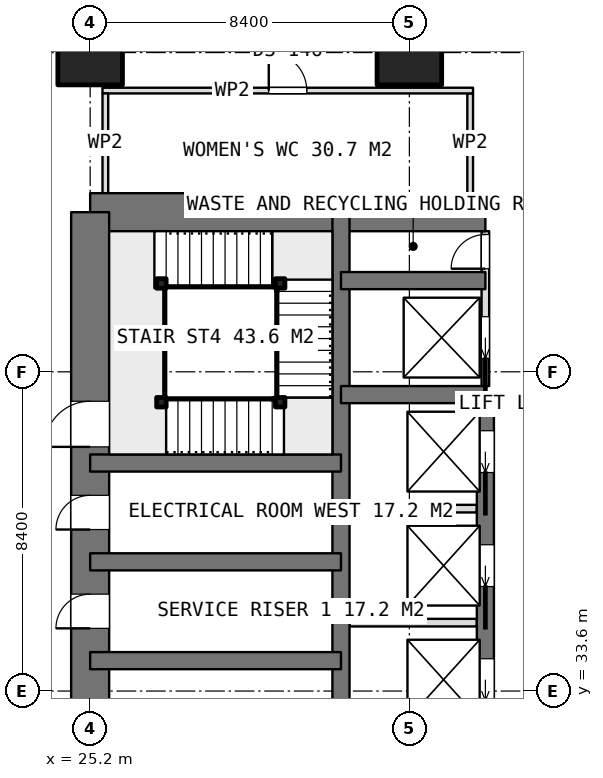
"""IFC4 building model, lengths in metres.
Left out: names, types, materials, properties, quantities, classifications, styles, units other than length and angle.
Written with IfcOpenShell. Run it as: python <this file> out.ifc"""

import sys

from ifc_helpers import new_model, si_unit, direction, frame, frame_2d, origin, origin_2d, place, context, subcontext, project, spatial, rectangle, extrude, element, fill, save


model = new_model("IFC4")
c1 = context("Model", 3, precision=1e-05, world=origin(), true_north=direction((0.0, 1.0)))
c2 = subcontext(c1, "Body", "Model", "MODEL_VIEW")
j1 = project(units=[si_unit("LENGTHUNIT", "METRE"), si_unit("PLANEANGLEUNIT", "RADIAN")], contexts=[c1])
p1 = place(None, origin())
s1 = spatial("IfcSite", under=j1, at=p1, CompositionType="ELEMENT")
p2 = place(p1, origin())
s2 = spatial("IfcBuilding", under=s1, at=p2, CompositionType="ELEMENT")
p3 = place(p2, frame((0.0, 0.0, 136.55)))
s3 = spatial("IfcBuildingStorey", under=s2, at=p3, CompositionType="ELEMENT", Elevation=136.55)
p4 = place(p3, frame((25.2, 46.2, 0.0), z_axis=(0.0, 0.0, 1.0), x_axis=(1.0, 0.0, 0.0)))
e1 = element("IfcWall", 1, at=p4, inside=s3, PredefinedType="SHEAR", context=c2, shape_type="SweptSolid", body=[
    extrude(rectangle(XDim=10.4, YDim=1.0, at=frame_2d((5.2, 0.0))), origin(), (0.0, 0.0, 1.0), 3.75),
])
p5 = place(p3, frame((25.2, 21.0, 0.0), z_axis=(0.0, 0.0, 1.0), x_axis=(0.0, 1.0, 0.0)))
e2 = element("IfcWall", 2, at=p5, inside=s3, PredefinedType="SHEAR", context=c2, shape_type="SweptSolid", body=[
    extrude(rectangle(XDim=25.2, YDim=1.0, at=frame_2d((12.6, 0.0))), origin(), (0.0, 0.0, 1.0), 3.75),
])
p6 = place(p5, frame((7.8, 0.0, 0.0)))
e3 = element("IfcOpeningElement", 3, at=p6, cuts=e2, PredefinedType="OPENING", context=c2, shape_type="SweptSolid", body=[
    extrude(rectangle(XDim=1.2, YDim=2.1, at=frame_2d((0.6, 1.05))), frame((0.0, 0.51, 0.0), z_axis=(0.0, -1.0, 0.0), x_axis=(1.0, 0.0, 0.0)), (0.0, 0.0, 1.0), 1.02),
])
p7 = place(p5, frame((14.25, 0.0, 0.0)))
e4 = element("IfcOpeningElement", 4, at=p7, cuts=e2, PredefinedType="OPENING", context=c2, shape_type="SweptSolid", body=[
    extrude(rectangle(XDim=0.9, YDim=2.1, at=frame_2d((0.45, 1.05))), frame((0.0, 0.51, 0.0), z_axis=(0.0, -1.0, 0.0), x_axis=(1.0, 0.0, 0.0)), (0.0, 0.0, 1.0), 1.02),
])
p8 = place(p5, frame((16.85, 0.0, 0.0)))
e5 = element("IfcOpeningElement", 5, at=p8, cuts=e2, PredefinedType="OPENING", context=c2, shape_type="SweptSolid", body=[
    extrude(rectangle(XDim=0.9, YDim=2.1, at=frame_2d((0.45, 1.05))), frame((0.0, 0.51, 0.0), z_axis=(0.0, -1.0, 0.0), x_axis=(1.0, 0.0, 0.0)), (0.0, 0.0, 1.0), 1.02),
])
p9 = place(p5, frame((19.025, 0.0, 0.0)))
e6 = element("IfcOpeningElement", 6, at=p9, cuts=e2, PredefinedType="OPENING", context=c2, shape_type="SweptSolid", body=[
    extrude(rectangle(XDim=1.2, YDim=2.1, at=frame_2d((0.6, 1.05))), frame((0.0, 0.51, 0.0), z_axis=(0.0, -1.0, 0.0), x_axis=(1.0, 0.0, 0.0)), (0.0, 0.0, 1.0), 1.02),
])
p10 = place(p3, frame((31.8, 21.0, 0.0), z_axis=(0.0, 0.0, 1.0), x_axis=(0.0, 1.0, 0.0)))
e7 = element("IfcWall", 7, at=p10, inside=s3, PredefinedType="SHEAR", context=c2, shape_type="SweptSolid", body=[
    extrude(rectangle(XDim=25.2, YDim=0.45, at=frame_2d((12.6, 0.0))), origin(), (0.0, 0.0, 1.0), 3.75),
])
p11 = place(p3, frame((35.6, 23.4, 0.0), z_axis=(0.0, 0.0, 1.0), x_axis=(0.0, 1.0, 0.0)))
e8 = element("IfcWall", 8, at=p11, inside=s3, PredefinedType="SHEAR", context=c2, shape_type="SweptSolid", body=[
    extrude(rectangle(XDim=18.0, YDim=0.45, at=frame_2d((9.0, 0.0))), origin(), (0.0, 0.0, 1.0), 3.75),
])
p12 = place(p11, frame((0.95, 0.0, 0.0)))
e9 = element("IfcOpeningElement", 9, at=p12, cuts=e8, PredefinedType="OPENING", context=c2, shape_type="SweptSolid", body=[
    extrude(rectangle(XDim=1.1, YDim=2.1, at=frame_2d((0.55, 1.05))), frame((0.0, 0.235, 0.0), z_axis=(0.0, -1.0, 0.0), x_axis=(1.0, 0.0, 0.0)), (0.0, 0.0, 1.0), 0.47),
])
p13 = place(p11, frame((3.95, 0.0, 0.0)))
e10 = element("IfcOpeningElement", 10, at=p13, cuts=e8, PredefinedType="OPENING", context=c2, shape_type="SweptSolid", body=[
    extrude(rectangle(XDim=1.1, YDim=2.1, at=frame_2d((0.55, 1.05))), frame((0.0, 0.235, 0.0), z_axis=(0.0, -1.0, 0.0), x_axis=(1.0, 0.0, 0.0)), (0.0, 0.0, 1.0), 0.47),
])
p14 = place(p11, frame((6.95, 0.0, 0.0)))
e11 = element("IfcOpeningElement", 11, at=p14, cuts=e8, PredefinedType="OPENING", context=c2, shape_type="SweptSolid", body=[
    extrude(rectangle(XDim=1.1, YDim=2.1, at=frame_2d((0.55, 1.05))), frame((0.0, 0.235, 0.0), z_axis=(0.0, -1.0, 0.0), x_axis=(1.0, 0.0, 0.0)), (0.0, 0.0, 1.0), 0.47),
])
p15 = place(p11, frame((9.95, 0.0, 0.0)))
e12 = element("IfcOpeningElement", 12, at=p15, cuts=e8, PredefinedType="OPENING", context=c2, shape_type="SweptSolid", body=[
    extrude(rectangle(XDim=1.1, YDim=2.1, at=frame_2d((0.55, 1.05))), frame((0.0, 0.235, 0.0), z_axis=(0.0, -1.0, 0.0), x_axis=(1.0, 0.0, 0.0)), (0.0, 0.0, 1.0), 0.47),
])
p16 = place(p11, frame((12.95, 0.0, 0.0)))
e13 = element("IfcOpeningElement", 13, at=p16, cuts=e8, PredefinedType="OPENING", context=c2, shape_type="SweptSolid", body=[
    extrude(rectangle(XDim=1.1, YDim=2.1, at=frame_2d((0.55, 1.05))), frame((0.0, 0.235, 0.0), z_axis=(0.0, -1.0, 0.0), x_axis=(1.0, 0.0, 0.0)), (0.0, 0.0, 1.0), 0.47),
])
p17 = place(p11, frame((15.95, 0.0, 0.0)))
e14 = element("IfcOpeningElement", 14, at=p17, cuts=e8, PredefinedType="OPENING", context=c2, shape_type="SweptSolid", body=[
    extrude(rectangle(XDim=1.1, YDim=2.1, at=frame_2d((0.55, 1.05))), frame((0.0, 0.235, 0.0), z_axis=(0.0, -1.0, 0.0), x_axis=(1.0, 0.0, 0.0)), (0.0, 0.0, 1.0), 0.47),
])
for number, where, z_axis, x_axis in (
    (15, (31.8, 41.4, 0.0), (0.0, 0.0, 1.0), (1.0, 0.0, 0.0)),
    (16, (31.8, 44.4, 0.0), (0.0, 0.0, 1.0), (1.0, 0.0, 0.0)),
):
    element("IfcWall", number, at=place(p3, frame(where, z_axis=z_axis, x_axis=x_axis)), inside=s3, PredefinedType="SHEAR", context=c2, shape_type="SweptSolid", body=[
        extrude(rectangle(XDim=3.8, YDim=0.45, at=frame_2d((1.9, 0.0))), origin(), (0.0, 0.0, 1.0), 3.75),
    ])
for number, where, z_axis, x_axis in (
    (17, (25.2, 34.4, 0.0), (0.0, 0.0, 1.0), (1.0, 0.0, 0.0)),
    (18, (25.2, 37.0, 0.0), (0.0, 0.0, 1.0), (1.0, 0.0, 0.0)),
    (19, (25.2, 39.6, 0.0), (0.0, 0.0, 1.0), (1.0, 0.0, 0.0)),
):
    element("IfcWall", number, at=place(p3, frame(where, z_axis=z_axis, x_axis=x_axis)), inside=s3, PredefinedType="SHEAR", context=c2, shape_type="SweptSolid", body=[
        extrude(rectangle(XDim=6.6, YDim=0.45, at=frame_2d((3.3, 0.0))), origin(), (0.0, 0.0, 1.0), 3.75),
    ])
for number, where, z_axis, x_axis in (
    (20, (25.2, 50.4, 0.0), (0.0, 0.0, 1.0), (1.0, 0.0, 0.0)),
    (21, (33.6, 50.4, 0.0), (0.0, 0.0, 1.0), (1.0, 0.0, 0.0)),
):
    element("IfcColumn", number, at=place(p3, frame(where, z_axis=z_axis, x_axis=x_axis)), inside=s3, PredefinedType="COLUMN", context=c2, shape_type="SweptSolid", body=[
        extrude(rectangle(XDim=1.7, YDim=1.7, at=origin_2d()), origin(), (0.0, 0.0, 1.0), 3.75),
    ])
for number, where, z_axis, x_axis in (
    (22, (32.025, 35.4, 0.0), (0.0, 0.0, 1.0), (1.0, 0.0, 0.0)),
    (23, (32.025, 38.4, 0.0), (0.0, 0.0, 1.0), (1.0, 0.0, 0.0)),
):
    element("IfcWall", number, at=place(p3, frame(where, z_axis=z_axis, x_axis=x_axis)), inside=s3, PredefinedType="PARTITIONING", context=c2, shape_type="SweptSolid", body=[
        extrude(rectangle(XDim=3.35, YDim=0.2, at=frame_2d((1.675, 0.0))), origin(), (0.0, 0.0, 1.0), 3.5),
    ])
p18 = place(p3, frame((35.6, 41.625, 0.0), z_axis=(0.0, 0.0, 1.0), x_axis=(0.0, 1.0, 0.0)))
e24 = element("IfcWall", 24, at=p18, inside=s3, PredefinedType="PARTITIONING", context=c2, shape_type="SweptSolid", body=[
    extrude(rectangle(XDim=4.075, YDim=0.2, at=frame_2d((2.038, 0.0))), origin(), (0.0, 0.0, 1.0), 3.5),
])
p19 = place(p18, frame((3.088, 0.0, 0.0)))
e25 = element("IfcOpeningElement", 25, at=p19, cuts=e24, PredefinedType="OPENING", context=c2, shape_type="SweptSolid", body=[
    extrude(rectangle(XDim=0.9, YDim=2.1, at=frame_2d((0.45, 1.05))), frame((0.0, 0.11, 0.0), z_axis=(0.0, -1.0, 0.0), x_axis=(1.0, 0.0, 0.0)), (0.0, 0.0, 1.0), 0.22),
])
p20 = place(p18, frame((0.725, 0.0, 0.0)))
e26 = element("IfcOpeningElement", 26, at=p20, cuts=e24, PredefinedType="OPENING", context=c2, shape_type="SweptSolid", body=[
    extrude(rectangle(XDim=1.1, YDim=2.1, at=frame_2d((0.55, 1.05))), frame((0.0, 0.11, 0.0), z_axis=(0.0, -1.0, 0.0), x_axis=(1.0, 0.0, 0.0)), (0.0, 0.0, 1.0), 0.22),
])
p21 = place(p3, frame((25.525, 49.4, 0.0), z_axis=(0.0, 0.0, 1.0), x_axis=(1.0, 0.0, 0.0)))
e27 = element("IfcWall", 27, at=p21, inside=s3, PredefinedType="PARTITIONING", context=c2, shape_type="SweptSolid", body=[
    extrude(rectangle(XDim=9.75, YDim=0.15, at=frame_2d((4.875, 0.0))), origin(), (0.0, 0.0, 1.0), 3.5),
])
p22 = place(p21, frame((4.375, 0.0, 0.0)))
e28 = element("IfcOpeningElement", 28, at=p22, cuts=e27, PredefinedType="OPENING", context=c2, shape_type="SweptSolid", body=[
    extrude(rectangle(XDim=1.0, YDim=2.1, at=frame_2d((0.5, 1.05))), frame((0.0, 0.085, 0.0), z_axis=(0.0, -1.0, 0.0), x_axis=(1.0, 0.0, 0.0)), (0.0, 0.0, 1.0), 0.17),
])
for number, where, z_axis, x_axis in (
    (29, (25.6, 46.7, 0.0), (0.0, 0.0, 1.0), (0.0, 1.0, 0.0)),
    (30, (35.2, 46.7, 0.0), (0.0, 0.0, 1.0), (0.0, 1.0, 0.0)),
):
    element("IfcWall", number, at=place(p3, frame(where, z_axis=z_axis, x_axis=x_axis)), inside=s3, PredefinedType="PARTITIONING", context=c2, shape_type="SweptSolid", body=[
        extrude(rectangle(XDim=2.625, YDim=0.15, at=frame_2d((1.312, 0.0))), origin(), (0.0, 0.0, 1.0), 3.5),
    ])
for number, where, z_axis, x_axis in (
    (31, (27.075, 41.2, 0.0), (0.0, 0.0, 1.0), (1.0, 0.0, 0.0)),
    (32, (30.2, 41.2, 0.0), (0.0, 0.0, 1.0), (1.0, 0.0, 0.0)),
    (33, (30.2, 44.325, 0.0), (0.0, 0.0, 1.0), (1.0, 0.0, 0.0)),
    (34, (27.075, 44.325, 0.0), (0.0, 0.0, 1.0), (1.0, 0.0, 0.0)),
):
    element("IfcColumn", number, at=place(p3, frame(where, z_axis=z_axis, x_axis=x_axis)), inside=s3, PredefinedType="COLUMN", context=c2, shape_type="SweptSolid", body=[
        extrude(rectangle(XDim=0.25, YDim=0.25, at=origin_2d()), origin(), (0.0, 0.0, 1.0), 3.75),
    ])
p23 = place(p7, origin())
e35 = element("IfcDoor", 35, at=p23, inside=s3, OperationType="SINGLE_SWING_LEFT", PredefinedType="DOOR", context=c2, shape_type="SweptSolid", body=[
    extrude(rectangle(XDim=0.9, YDim=2.1, at=frame_2d((0.45, 1.05))), frame((0.0, 0.025, 0.0), z_axis=(0.0, -1.0, 0.0), x_axis=(1.0, 0.0, 0.0)), (0.0, 0.0, 1.0), 0.05),
])
fill(e4, e35)
p24 = place(p8, origin())
e36 = element("IfcDoor", 36, at=p24, inside=s3, OperationType="SINGLE_SWING_LEFT", PredefinedType="DOOR", context=c2, shape_type="SweptSolid", body=[
    extrude(rectangle(XDim=0.9, YDim=2.1, at=frame_2d((0.45, 1.05))), frame((0.0, 0.025, 0.0), z_axis=(0.0, -1.0, 0.0), x_axis=(1.0, 0.0, 0.0)), (0.0, 0.0, 1.0), 0.05),
])
fill(e5, e36)
p25 = place(p19, origin())
e37 = element("IfcDoor", 37, at=p25, inside=s3, OperationType="SINGLE_SWING_LEFT", PredefinedType="DOOR", context=c2, shape_type="SweptSolid", body=[
    extrude(rectangle(XDim=0.9, YDim=2.1, at=frame_2d((0.45, 1.05))), frame((0.0, 0.025, 0.0), z_axis=(0.0, -1.0, 0.0), x_axis=(1.0, 0.0, 0.0)), (0.0, 0.0, 1.0), 0.05),
])
fill(e25, e37)
p26 = place(p15, origin())
e38 = element("IfcDoor", 38, at=p26, inside=s3, OperationType="SLIDING_TO_LEFT", PredefinedType="USERDEFINED", context=c2, shape_type="SweptSolid", body=[
    extrude(rectangle(XDim=1.1, YDim=2.1, at=frame_2d((0.55, 1.05))), frame((0.0, 0.025, 0.0), z_axis=(0.0, -1.0, 0.0), x_axis=(1.0, 0.0, 0.0)), (0.0, 0.0, 1.0), 0.05),
])
fill(e12, e38)
p27 = place(p16, origin())
e39 = element("IfcDoor", 39, at=p27, inside=s3, OperationType="SLIDING_TO_LEFT", PredefinedType="USERDEFINED", context=c2, shape_type="SweptSolid", body=[
    extrude(rectangle(XDim=1.1, YDim=2.1, at=frame_2d((0.55, 1.05))), frame((0.0, 0.025, 0.0), z_axis=(0.0, -1.0, 0.0), x_axis=(1.0, 0.0, 0.0)), (0.0, 0.0, 1.0), 0.05),
])
fill(e13, e39)
p28 = place(p17, origin())
e40 = element("IfcDoor", 40, at=p28, inside=s3, OperationType="SLIDING_TO_LEFT", PredefinedType="USERDEFINED", context=c2, shape_type="SweptSolid", body=[
    extrude(rectangle(XDim=1.1, YDim=2.1, at=frame_2d((0.55, 1.05))), frame((0.0, 0.025, 0.0), z_axis=(0.0, -1.0, 0.0), x_axis=(1.0, 0.0, 0.0)), (0.0, 0.0, 1.0), 0.05),
])
fill(e14, e40)
p29 = place(p20, origin())
e41 = element("IfcDoor", 41, at=p29, inside=s3, OperationType="SLIDING_TO_LEFT", PredefinedType="USERDEFINED", context=c2, shape_type="SweptSolid", body=[
    extrude(rectangle(XDim=1.1, YDim=2.1, at=frame_2d((0.55, 1.05))), frame((0.0, 0.025, 0.0), z_axis=(0.0, -1.0, 0.0), x_axis=(1.0, 0.0, 0.0)), (0.0, 0.0, 1.0), 0.05),
])
fill(e26, e41)
p30 = place(p22, origin())
e42 = element("IfcDoor", 42, at=p30, inside=s3, OperationType="SINGLE_SWING_LEFT", PredefinedType="DOOR", context=c2, shape_type="SweptSolid", body=[
    extrude(rectangle(XDim=1.0, YDim=2.1, at=frame_2d((0.5, 1.05))), frame((0.0, 0.025, 0.0), z_axis=(0.0, -1.0, 0.0), x_axis=(1.0, 0.0, 0.0)), (0.0, 0.0, 1.0), 0.05),
])
fill(e28, e42)
p31 = place(p9, origin())
e43 = element("IfcDoor", 43, at=p31, inside=s3, OperationType="SINGLE_SWING_RIGHT", PredefinedType="DOOR", context=c2, shape_type="SweptSolid", body=[
    extrude(rectangle(XDim=1.2, YDim=2.1, at=frame_2d((0.6, 1.05))), frame((0.0, 0.025, 0.0), z_axis=(0.0, -1.0, 0.0), x_axis=(1.0, 0.0, 0.0)), (0.0, 0.0, 1.0), 0.05),
])
fill(e6, e43)
save(model, sys.argv[1])
